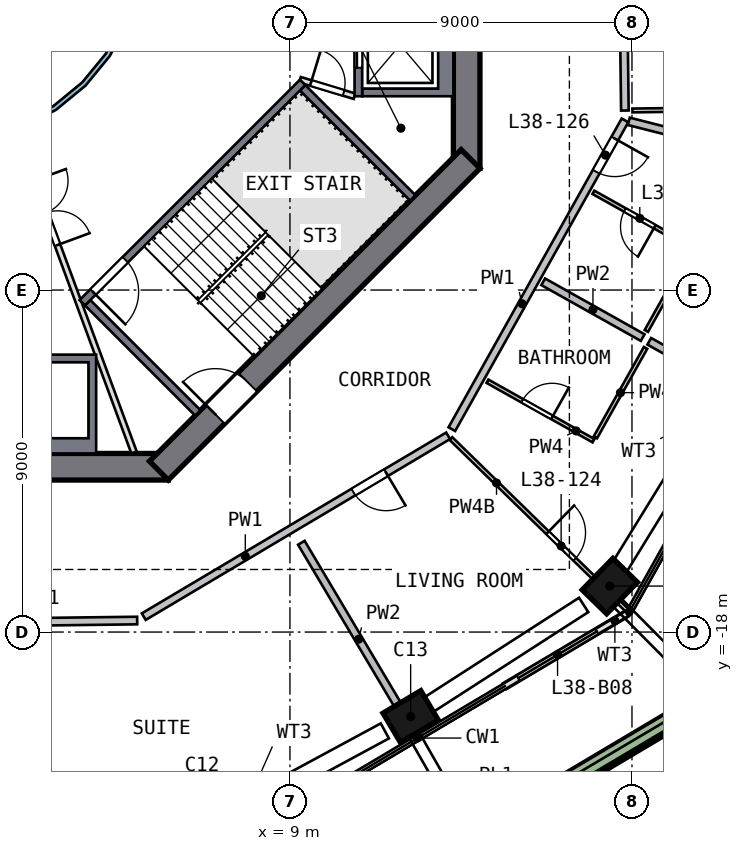
"""IFC4 building model, lengths in metres.
Left out: names, types, materials, properties, quantities, classifications, styles, units other than length and angle.
Written with IfcOpenShell. Run it as: python <this file> out.ifc"""

import sys

from ifc_helpers import new_model, si_unit, direction, frame, frame_2d, origin, origin_2d, place, context, subcontext, project, spatial, polyline, rectangle, outline, extrude, element, fill, save


model = new_model("IFC4")
c1 = context("Model", 3, precision=1e-05, world=origin(), true_north=direction((0.0, 1.0)))
c2 = subcontext(c1, "Body", "Model", "MODEL_VIEW")
j1 = project(units=[si_unit("LENGTHUNIT", "METRE"), si_unit("PLANEANGLEUNIT", "RADIAN")], contexts=[c1])
p1 = place(None, origin())
s1 = spatial("IfcSite", under=j1, at=p1, CompositionType="ELEMENT")
p2 = place(p1, origin())
s2 = spatial("IfcBuilding", under=s1, at=p2, CompositionType="ELEMENT")
p3 = place(p2, frame((0.0, 0.0, 158.5)))
s3 = spatial("IfcBuildingStorey", under=s2, at=p3, CompositionType="ELEMENT", Elevation=158.5)
p4 = place(p3, frame((12.06, -20.295, 0.0), z_axis=(0.095976319, 0.058178989, 0.993681917), x_axis=(0.854089929, 0.507873055, -0.11222902)))
e1 = element("IfcColumn", 1, at=p4, inside=s3, PredefinedType="COLUMN", context=c2, shape_type="SweptSolid", body=[
    extrude(rectangle(XDim=1.15, YDim=0.9, at=origin_2d()), origin(), (0.0, 0.0, 1.0), 3.21),
])
p5 = place(p3, frame((17.32, -16.89, 0.0), z_axis=(0.079675403, 0.083020554, 0.993357649), x_axis=(-0.693882614, -0.710835619, 0.115063637)))
e2 = element("IfcColumn", 2, at=p5, inside=s3, PredefinedType="COLUMN", context=c2, shape_type="SweptSolid", body=[
    extrude(rectangle(XDim=1.15, YDim=0.9, at=origin_2d()), origin(), (0.0, 0.0, 1.0), 3.211),
])
p6 = place(p3, frame((13.65, -5.799, 0.0), z_axis=(0.0, 0.0, 1.0), x_axis=(0.0, 1.0, 0.0)))
e3 = element("IfcWall", 3, at=p6, inside=s3, PredefinedType="SHEAR", context=c2, shape_type="SweptSolid", body=[
    extrude(rectangle(XDim=11.598, YDim=0.7, at=frame_2d((5.799, 0.0))), origin(), (0.0, 0.0, 1.0), 3.5),
])
p7 = place(p6, frame((4.899, 0.0, 0.0)))
e4 = element("IfcOpeningElement", 4, at=p7, cuts=e3, PredefinedType="OPENING", context=c2, shape_type="SweptSolid", body=[
    extrude(rectangle(XDim=1.8, YDim=2.1, at=frame_2d((0.9, 1.05))), frame((0.0, 0.36, 0.0), z_axis=(0.0, -1.0, 0.0), x_axis=(1.0, 0.0, 0.0)), (0.0, 0.0, 1.0), 0.72),
])
p8 = place(p3, frame((-5.799, -13.65, 0.0), z_axis=(0.0, 0.0, 1.0), x_axis=(1.0, 0.0, 0.0)))
e5 = element("IfcWall", 5, at=p8, inside=s3, PredefinedType="SHEAR", context=c2, shape_type="SweptSolid", body=[
    extrude(rectangle(XDim=11.598, YDim=0.7, at=frame_2d((5.799, 0.0))), origin(), (0.0, 0.0, 1.0), 3.5),
])
p9 = place(p8, frame((4.899, 0.0, 0.0)))
e6 = element("IfcOpeningElement", 6, at=p9, cuts=e5, PredefinedType="OPENING", context=c2, shape_type="SweptSolid", body=[
    extrude(rectangle(XDim=1.8, YDim=2.1, at=frame_2d((0.9, 1.05))), frame((0.0, 0.36, 0.0), z_axis=(0.0, -1.0, 0.0), x_axis=(1.0, 0.0, 0.0)), (0.0, 0.0, 1.0), 0.72),
])
p10 = place(p3, frame((5.552, -13.752, 0.0), z_axis=(0.0, 0.0, 1.0), x_axis=(0.707106781, 0.707106781, 0.0)))
e7 = element("IfcWall", 7, at=p10, inside=s3, PredefinedType="SHEAR", context=c2, shape_type="SweptSolid", body=[
    extrude(rectangle(XDim=11.598, YDim=0.7, at=frame_2d((5.799, 0.0))), origin(), (0.0, 0.0, 1.0), 3.5),
])
p11 = place(p10, frame((2.099, 0.0, 0.0)))
e8 = element("IfcOpeningElement", 8, at=p11, cuts=e7, PredefinedType="OPENING", context=c2, shape_type="SweptSolid", body=[
    extrude(rectangle(XDim=1.2, YDim=2.1, at=frame_2d((0.6, 1.05))), frame((0.0, 0.36, 0.0), z_axis=(0.0, -1.0, 0.0), x_axis=(1.0, 0.0, 0.0)), (0.0, 0.0, 1.0), 0.72),
])
p12 = place(p3, frame((14.666, -19.416, 0.0), z_axis=(0.0, 0.0, 1.0), x_axis=(0.859691314, 0.510813905, 0.0)))
e9 = element("IfcWall", 9, at=p12, inside=s3, PredefinedType="SOLIDWALL", context=c2, shape_type="SweptSolid", body=[
    extrude(rectangle(XDim=3.71, YDim=0.15, at=frame_2d((1.855, 0.0))), origin(), (0.0, 0.0, 1.0), 2.475),
])
p13 = place(p12, frame((0.4, 0.0, 0.0)))
e10 = element("IfcOpeningElement", 10, at=p13, cuts=e9, PredefinedType="OPENING", context=c2, shape_type="SweptSolid", body=[
    extrude(rectangle(XDim=2.4, YDim=2.4, at=frame_2d((1.2, 1.2))), frame((0.0, 0.085, 0.0), z_axis=(0.0, -1.0, 0.0), x_axis=(1.0, 0.0, 0.0)), (0.0, 0.0, 1.0), 0.17),
])
p14 = place(p3, frame((8.741, -26.455, 0.0), z_axis=(0.0, 0.0, 1.0), x_axis=(0.85967461, 0.510842016, 0.0)))
e11 = element("IfcWall", 11, at=p14, inside=s3, PredefinedType="SOLIDWALL", context=c2, shape_type="SweptSolid", body=[
    extrude(rectangle(XDim=13.224, YDim=0.5, at=frame_2d((6.612, 0.0))), origin(), (0.0, 0.0, 1.0), 0.7),
])
p15 = place(p3, origin())
e12 = element("IfcWall", 12, at=p15, inside=s3, PredefinedType="SOLIDWALL", context=c2, shape_type="SweptSolid", body=[
    extrude(outline(polyline([(13.3, -3.9), (10.9, -3.9), (10.9, -3.7), (12.9, -3.7), (12.9, -1.4), (10.9, -1.4), (10.9, -1.2), (13.3, -1.2), (13.3, -3.9)])), origin(), (0.0, 0.0, 1.0), 3.19),
])
p16 = place(p3, frame((10.8, -1.2, 0.0), z_axis=(0.0, 0.0, 1.0), x_axis=(0.0, -1.0, 0.0)))
e13 = element("IfcWall", 13, at=p16, inside=s3, PredefinedType="SOLIDWALL", context=c2, shape_type="SweptSolid", body=[
    extrude(rectangle(XDim=2.7, YDim=0.2, at=frame_2d((1.35, 0.0))), origin(), (0.0, 0.0, 1.0), 3.19),
])
p17 = place(p16, frame((0.75, 0.0, 0.0)))
e14 = element("IfcOpeningElement", 14, at=p17, cuts=e13, PredefinedType="OPENING", context=c2, shape_type="SweptSolid", body=[
    extrude(rectangle(XDim=1.2, YDim=2.1, at=frame_2d((0.6, 1.05))), frame((0.0, 0.11, 0.0), z_axis=(0.0, -1.0, 0.0), x_axis=(1.0, 0.0, 0.0)), (0.0, 0.0, 1.0), 0.22),
])
p18 = place(p3, origin())
e15 = element("IfcWall", 15, at=p18, inside=s3, PredefinedType="SOLIDWALL", context=c2, shape_type="SweptSolid", body=[
    extrude(outline(polyline([(3.9, -10.7), (3.9, -13.3), (1.2, -13.3), (1.2, -10.7), (3.9, -10.7)]), holes=[polyline([(1.4, -12.9), (3.7, -12.9), (3.7, -10.9), (1.4, -10.9), (1.4, -12.9)])]), origin(), (0.0, 0.0, 1.0), 3.19),
])
p19 = place(p3, frame((9.334, -3.535, 0.0), z_axis=(0.0, 0.0, 1.0), x_axis=(-0.707106781, -0.707106781, 0.0)))
e16 = element("IfcWall", 16, at=p19, inside=s3, PredefinedType="SOLIDWALL", context=c2, shape_type="SweptSolid", body=[
    extrude(rectangle(XDim=8.2, YDim=0.2, at=frame_2d((4.1, 0.0))), origin(), (0.0, 0.0, 1.0), 3.19),
])
p20 = place(p19, frame((6.6, 0.0, 0.0)))
e17 = element("IfcOpeningElement", 17, at=p20, cuts=e16, PredefinedType="OPENING", context=c2, shape_type="SweptSolid", body=[
    extrude(rectangle(XDim=1.2, YDim=2.1, at=frame_2d((0.6, 1.05))), frame((0.0, 0.11, 0.0), z_axis=(0.0, -1.0, 0.0), x_axis=(1.0, 0.0, 0.0)), (0.0, 0.0, 1.0), 0.22),
])
for number, where, z_axis, x_axis in (
    (18, (3.677, -9.334, 0.0), (0.0, 0.0, 1.0), (0.707, -0.707, 0.0)),
    (19, (9.334, -3.677, 0.0), (0.0, 0.0, 1.0), (0.707, -0.707, 0.0)),
):
    element("IfcWall", number, at=place(p3, frame(where, z_axis=z_axis, x_axis=x_axis)), inside=s3, PredefinedType="SOLIDWALL", context=c2, shape_type="SweptSolid", body=[
        extrude(rectangle(XDim=4.1, YDim=0.2, at=frame_2d((2.05, 0.0))), origin(), (0.0, 0.0, 1.0), 3.19),
    ])
p21 = place(p3, frame((9.263, -3.465, 0.0), z_axis=(0.0, 0.0, 1.0), x_axis=(0.957084567, -0.289808785, 0.0)))
e20 = element("IfcWall", 20, at=p21, inside=s3, PredefinedType="PARTITIONING", context=c2, shape_type="SweptSolid", body=[
    extrude(rectangle(XDim=1.501, YDim=0.15, at=frame_2d((0.75, 0.0))), origin(), (0.0, 0.0, 1.0), 3.19),
])
p22 = place(p21, frame((0.301, 0.0, 0.0)))
e21 = element("IfcOpeningElement", 21, at=p22, cuts=e20, PredefinedType="OPENING", context=c2, shape_type="SweptSolid", body=[
    extrude(rectangle(XDim=0.9, YDim=2.1, at=frame_2d((0.45, 1.05))), frame((0.0, 0.085, 0.0), z_axis=(0.0, -1.0, 0.0), x_axis=(1.0, 0.0, 0.0)), (0.0, 0.0, 1.0), 0.17),
])
p23 = place(p3, frame((1.776, -4.813, 0.0), z_axis=(0.0, 0.0, 1.0), x_axis=(0.346109381, -0.938194168, 0.0)))
e22 = element("IfcWall", 22, at=p23, inside=s3, PredefinedType="PARTITIONING", context=c2, shape_type="SweptSolid", body=[
    extrude(rectangle(XDim=9.016, YDim=0.15, at=frame_2d((4.508, 0.0))), origin(), (0.0, 0.0, 1.0), 3.19),
])
p24 = place(p23, frame((1.4, 0.0, 0.0)))
e23 = element("IfcOpeningElement", 23, at=p24, cuts=e22, PredefinedType="OPENING", context=c2, shape_type="SweptSolid", body=[
    extrude(rectangle(XDim=1.8, YDim=2.1, at=frame_2d((0.9, 1.05))), frame((0.0, 0.085, 0.0), z_axis=(0.0, -1.0, 0.0), x_axis=(1.0, 0.0, 0.0)), (0.0, 0.0, 1.0), 0.17),
])
p25 = place(p3, origin())
e24 = element("IfcWall", 24, at=p25, inside=s3, PredefinedType="SOLIDWALL", context=c2, shape_type="SweptSolid", body=[
    extrude(outline(polyline([(5.021, -0.999), (4.73, -1.959), (4.257, -2.844), (3.62, -3.62), (2.844, -4.257), (1.959, -4.73), (0.999, -5.021), (0.0, -5.12), (-0.999, -5.021), (-1.959, -4.73), (-2.844, -4.257), (-3.62, -3.62), (-4.257, -2.844), (-4.73, -1.959), (-5.021, -0.999), (-5.12, 0.0), (-5.021, 0.999), (-4.73, 1.959), (-4.257, 2.844), (-3.62, 3.62), (-2.844, 4.257), (-1.959, 4.73), (-0.999, 5.021), (0.0, 5.12), (0.999, 5.021), (1.959, 4.73), (2.844, 4.257), (3.62, 3.62), (4.257, 2.844), (4.73, 1.959), (5.021, 0.999), (5.12, 0.0), (5.021, -0.999)]), holes=[polyline([(4.904, 0.976), (4.619, 1.913), (4.157, 2.778), (3.535, 3.535), (2.778, 4.157), (1.913, 4.619), (0.976, 4.904), (0.0, 5.0), (-0.976, 4.904), (-1.913, 4.619), (-2.778, 4.157), (-3.535, 3.535), (-4.157, 2.778), (-4.619, 1.913), (-4.904, 0.976), (-5.0, 0.0), (-4.904, -0.976), (-4.619, -1.913), (-4.157, -2.778), (-3.535, -3.535), (-2.778, -4.157), (-1.913, -4.619), (-0.976, -4.904), (0.0, -5.0), (0.976, -4.904), (1.913, -4.619), (2.778, -4.157), (3.535, -3.535), (4.157, -2.778), (4.619, -1.913), (4.904, -0.976), (5.0, 0.0), (4.904, 0.976)])]), origin(), (0.0, 0.0, 1.0), 3.19),
])
p26 = place(p3, frame((4.981, -17.697, 0.0), z_axis=(0.0, 0.0, 1.0), x_axis=(-0.999920882, -0.01257894, 0.0)))
e25 = element("IfcWall", 25, at=p26, inside=s3, PredefinedType="SOLIDWALL", context=c2, shape_type="SweptSolid", body=[
    extrude(rectangle(XDim=9.316, YDim=0.2, at=frame_2d((4.658, 0.0))), origin(), (0.0, 0.0, 1.0), 3.19),
])
p27 = place(p26, frame((5.15, 0.0, 0.0)))
e26 = element("IfcOpeningElement", 26, at=p27, cuts=e25, PredefinedType="OPENING", context=c2, shape_type="SweptSolid", body=[
    extrude(rectangle(XDim=1.0, YDim=2.1, at=frame_2d((0.5, 1.05))), frame((0.0, 0.11, 0.0), z_axis=(0.0, -1.0, 0.0), x_axis=(1.0, 0.0, 0.0)), (0.0, 0.0, 1.0), 0.22),
])
p28 = place(p3, frame((13.162, -12.836, 0.0), z_axis=(0.0, 0.0, 1.0), x_axis=(-0.859674935, -0.510841468, 0.0)))
e27 = element("IfcWall", 27, at=p28, inside=s3, PredefinedType="SOLIDWALL", context=c2, shape_type="SweptSolid", body=[
    extrude(rectangle(XDim=9.316, YDim=0.2, at=frame_2d((4.658, 0.0))), origin(), (0.0, 0.0, 1.0), 3.19),
])
p29 = place(p28, frame((1.9, 0.0, 0.0)))
e28 = element("IfcOpeningElement", 28, at=p29, cuts=e27, PredefinedType="OPENING", context=c2, shape_type="SweptSolid", body=[
    extrude(rectangle(XDim=1.0, YDim=2.1, at=frame_2d((0.5, 1.05))), frame((0.0, 0.11, 0.0), z_axis=(0.0, -1.0, 0.0), x_axis=(1.0, 0.0, 0.0)), (0.0, 0.0, 1.0), 0.22),
])
p30 = place(p3, frame((17.817, -4.535, 0.0), z_axis=(0.0, 0.0, 1.0), x_axis=(-0.489090048, -0.872233297, 0.0)))
e29 = element("IfcWall", 29, at=p30, inside=s3, PredefinedType="SOLIDWALL", context=c2, shape_type="SweptSolid", body=[
    extrude(rectangle(XDim=9.317, YDim=0.2, at=frame_2d((4.658, 0.0))), origin(), (0.0, 0.0, 1.0), 3.19),
])
p31 = place(p30, frame((0.55, 0.0, 0.0)))
e30 = element("IfcOpeningElement", 30, at=p31, cuts=e29, PredefinedType="OPENING", context=c2, shape_type="SweptSolid", body=[
    extrude(rectangle(XDim=1.0, YDim=2.1, at=frame_2d((0.5, 1.05))), frame((0.0, 0.11, 0.0), z_axis=(0.0, -1.0, 0.0), x_axis=(1.0, 0.0, 0.0)), (0.0, 0.0, 1.0), 0.22),
])
p32 = place(p3, frame((17.813, -4.277, 0.0), z_axis=(0.0, 0.0, 1.0), x_axis=(-0.01256543, 0.999921052, 0.0)))
e31 = element("IfcWall", 31, at=p32, inside=s3, PredefinedType="SOLIDWALL", context=c2, shape_type="SweptSolid", body=[
    extrude(rectangle(XDim=3.4, YDim=0.2, at=frame_2d((1.7, 0.0))), origin(), (0.0, 0.0, 1.0), 3.19),
])
p33 = place(p3, frame((9.3, -15.651, 0.0), z_axis=(0.0, 0.0, 1.0), x_axis=(0.510811085, -0.859692989, 0.0)))
e32 = element("IfcWall", 32, at=p33, inside=s3, PredefinedType="SOLIDWALL", context=c2, shape_type="SweptSolid", body=[
    extrude(rectangle(XDim=5.903, YDim=0.2, at=frame_2d((2.951, 0.0))), origin(), (0.0, 0.0, 1.0), 3.19),
])
p34 = place(p3, frame((15.664, -8.783, 0.0), z_axis=(0.0, 0.0, 1.0), x_axis=(0.872228513, -0.489098581, 0.0)))
e33 = element("IfcWall", 33, at=p34, inside=s3, PredefinedType="SOLIDWALL", context=c2, shape_type="SweptSolid", body=[
    extrude(rectangle(XDim=3.002, YDim=0.2, at=frame_2d((1.501, 0.0))), origin(), (0.0, 0.0, 1.0), 3.19),
])
p35 = place(p3, frame((18.455, -10.348, 0.0), z_axis=(0.0, 0.0, 1.0), x_axis=(0.872237762, -0.489082085, 0.0)))
e34 = element("IfcWall", 34, at=p35, inside=s3, PredefinedType="SOLIDWALL", context=c2, shape_type="SweptSolid", body=[
    extrude(rectangle(XDim=2.95, YDim=0.2, at=frame_2d((1.475, 0.0))), origin(), (0.0, 0.0, 1.0), 3.19),
])
p36 = place(p3, frame((17.917, -4.56, 0.0), z_axis=(0.0, 0.0, 1.0), x_axis=(0.969097993, -0.246676062, 0.0)))
e35 = element("IfcWall", 35, at=p36, inside=s3, PredefinedType="SOLIDWALL", context=c2, shape_type="SweptSolid", body=[
    extrude(rectangle(XDim=6.476, YDim=0.2, at=frame_2d((3.238, 0.0))), origin(), (0.0, 0.0, 1.0), 3.19),
])
p37 = place(p3, frame((13.237, -12.908, 0.0), z_axis=(0.0, 0.0, 1.0), x_axis=(0.71592947, -0.69817261, 0.0)))
e36 = element("IfcWall", 36, at=p37, inside=s3, PredefinedType="PARTITIONING", context=c2, shape_type="SweptSolid", body=[
    extrude(rectangle(XDim=6.476, YDim=0.1, at=frame_2d((3.238, 0.0))), origin(), (0.0, 0.0, 1.0), 2.69),
])
p38 = place(p37, frame((3.55, 0.0, 0.0)))
e37 = element("IfcOpeningElement", 37, at=p38, cuts=e36, PredefinedType="OPENING", context=c2, shape_type="SweptSolid", body=[
    extrude(rectangle(XDim=1.0, YDim=2.1, at=frame_2d((0.5, 1.05))), frame((0.0, 0.06, 0.0), z_axis=(0.0, -1.0, 0.0), x_axis=(1.0, 0.0, 0.0)), (0.0, 0.0, 1.0), 0.12),
])
p39 = place(p3, frame((14.197, -11.4, 0.0), z_axis=(0.0, 0.0, 1.0), x_axis=(0.872210525, -0.489130657, 0.0)))
e38 = element("IfcWall", 38, at=p39, inside=s3, PredefinedType="PARTITIONING", context=c2, shape_type="SweptSolid", body=[
    extrude(rectangle(XDim=3.2, YDim=0.1, at=frame_2d((1.6, 0.0))), origin(), (0.0, 0.0, 1.0), 3.19),
])
p40 = place(p39, frame((1.05, 0.0, 0.0)))
e39 = element("IfcOpeningElement", 39, at=p40, cuts=e38, PredefinedType="OPENING", context=c2, shape_type="SweptSolid", body=[
    extrude(rectangle(XDim=0.9, YDim=2.1, at=frame_2d((0.45, 1.05))), frame((0.0, 0.06, 0.0), z_axis=(0.0, -1.0, 0.0), x_axis=(1.0, 0.0, 0.0)), (0.0, 0.0, 1.0), 0.12),
])
p41 = place(p3, frame((17.037, -12.878, 0.0), z_axis=(0.0, 0.0, 1.0), x_axis=(0.489063093, 0.872248411, 0.0)))
e40 = element("IfcWall", 40, at=p41, inside=s3, PredefinedType="PARTITIONING", context=c2, shape_type="SweptSolid", body=[
    extrude(rectangle(XDim=2.7, YDim=0.1, at=frame_2d((1.35, 0.0))), origin(), (0.0, 0.0, 1.0), 3.19),
])
p42 = place(p3, frame((19.601, -7.895, 0.0), z_axis=(0.0, 0.0, 1.0), x_axis=(-0.872231109, 0.489093951, 0.0)))
e41 = element("IfcWall", 41, at=p42, inside=s3, PredefinedType="PARTITIONING", context=c2, shape_type="SweptSolid", body=[
    extrude(rectangle(XDim=3.0, YDim=0.1, at=frame_2d((1.5, 0.0))), origin(), (0.0, 0.0, 1.0), 3.19),
])
p43 = place(p42, frame((1.15, 0.0, 0.0)))
e42 = element("IfcOpeningElement", 42, at=p43, cuts=e41, PredefinedType="OPENING", context=c2, shape_type="SweptSolid", body=[
    extrude(rectangle(XDim=0.9, YDim=2.1, at=frame_2d((0.45, 1.05))), frame((0.0, 0.06, 0.0), z_axis=(0.0, -1.0, 0.0), x_axis=(1.0, 0.0, 0.0)), (0.0, 0.0, 1.0), 0.12),
])
p44 = place(p3, frame((19.552, -7.982, 0.0), z_axis=(0.0, 0.0, 1.0), x_axis=(-0.48911131, -0.872221375, 0.0)))
e43 = element("IfcWall", 43, at=p44, inside=s3, PredefinedType="PARTITIONING", context=c2, shape_type="SweptSolid", body=[
    extrude(rectangle(XDim=2.4, YDim=0.1, at=frame_2d((1.2, 0.0))), origin(), (0.0, 0.0, 1.0), 3.19),
])
p45 = place(p3, frame((18.013, -4.274, 0.0), z_axis=(0.0, 0.0, 1.0), x_axis=(0.999921006, 0.012569092, 0.0)))
e44 = element("IfcWall", 44, at=p45, inside=s3, PredefinedType="PARTITIONING", context=c2, shape_type="SweptSolid", body=[
    extrude(rectangle(XDim=2.7, YDim=0.1, at=frame_2d((1.35, 0.0))), origin(), (0.0, 0.0, 1.0), 3.19),
])
p46 = place(p13, origin())
e45 = element("IfcDoor", 45, at=p46, inside=s3, OperationType="SLIDING_TO_RIGHT", PredefinedType="DOOR", context=c2, shape_type="SweptSolid", body=[
    extrude(rectangle(XDim=2.4, YDim=2.4, at=frame_2d((1.2, 1.2))), frame((0.0, 0.025, 0.0), z_axis=(0.0, -1.0, 0.0), x_axis=(1.0, 0.0, 0.0)), (0.0, 0.0, 1.0), 0.05),
])
fill(e10, e45)
p47 = place(p17, origin())
e46 = element("IfcDoor", 46, at=p47, inside=s3, OperationType="DOUBLE_DOOR_SLIDING", PredefinedType="DOOR", context=c2, shape_type="SweptSolid", body=[
    extrude(rectangle(XDim=1.2, YDim=2.1, at=frame_2d((0.6, 1.05))), frame((0.0, 0.025, 0.0), z_axis=(0.0, -1.0, 0.0), x_axis=(1.0, 0.0, 0.0)), (0.0, 0.0, 1.0), 0.05),
])
fill(e14, e46)
p48 = place(p20, origin())
e47 = element("IfcDoor", 47, at=p48, inside=s3, OperationType="SINGLE_SWING_RIGHT", PredefinedType="DOOR", context=c2, shape_type="SweptSolid", body=[
    extrude(rectangle(XDim=1.2, YDim=2.1, at=frame_2d((0.6, 1.05))), frame((0.0, 0.025, 0.0), z_axis=(0.0, -1.0, 0.0), x_axis=(1.0, 0.0, 0.0)), (0.0, 0.0, 1.0), 0.05),
])
fill(e17, e47)
p49 = place(p11, origin())
e48 = element("IfcDoor", 48, at=p49, inside=s3, OperationType="SINGLE_SWING_LEFT", PredefinedType="DOOR", context=c2, shape_type="SweptSolid", body=[
    extrude(rectangle(XDim=1.2, YDim=2.1, at=frame_2d((0.6, 1.05))), frame((0.0, 0.025, 0.0), z_axis=(0.0, -1.0, 0.0), x_axis=(1.0, 0.0, 0.0)), (0.0, 0.0, 1.0), 0.05),
])
fill(e8, e48)
p50 = place(p22, origin())
e49 = element("IfcDoor", 49, at=p50, inside=s3, OperationType="SINGLE_SWING_LEFT", PredefinedType="DOOR", context=c2, shape_type="SweptSolid", body=[
    extrude(rectangle(XDim=0.9, YDim=2.1, at=frame_2d((0.45, 1.05))), frame((0.0, 0.025, 0.0), z_axis=(0.0, -1.0, 0.0), x_axis=(1.0, 0.0, 0.0)), (0.0, 0.0, 1.0), 0.05),
])
fill(e21, e49)
p51 = place(p24, origin())
e50 = element("IfcDoor", 50, at=p51, inside=s3, OperationType="DOUBLE_DOOR_SINGLE_SWING", PredefinedType="DOOR", context=c2, shape_type="SweptSolid", body=[
    extrude(rectangle(XDim=1.8, YDim=2.1, at=frame_2d((0.9, 1.05))), frame((0.0, 0.025, 0.0), z_axis=(0.0, -1.0, 0.0), x_axis=(1.0, 0.0, 0.0)), (0.0, 0.0, 1.0), 0.05),
])
fill(e23, e50)
p52 = place(p29, origin())
e51 = element("IfcDoor", 51, at=p52, inside=s3, OperationType="SINGLE_SWING_LEFT", PredefinedType="DOOR", context=c2, shape_type="SweptSolid", body=[
    extrude(rectangle(XDim=1.0, YDim=2.1, at=frame_2d((0.5, 1.05))), frame((0.0, 0.025, 0.0), z_axis=(0.0, -1.0, 0.0), x_axis=(1.0, 0.0, 0.0)), (0.0, 0.0, 1.0), 0.05),
])
fill(e28, e51)
p53 = place(p38, origin())
e52 = element("IfcDoor", 52, at=p53, inside=s3, OperationType="SINGLE_SWING_LEFT", PredefinedType="DOOR", context=c2, shape_type="SweptSolid", body=[
    extrude(rectangle(XDim=1.0, YDim=2.1, at=frame_2d((0.5, 1.05))), frame((0.0, 0.025, 0.0), z_axis=(0.0, -1.0, 0.0), x_axis=(1.0, 0.0, 0.0)), (0.0, 0.0, 1.0), 0.05),
])
fill(e37, e52)
p54 = place(p40, origin())
e53 = element("IfcDoor", 53, at=p54, inside=s3, OperationType="SINGLE_SWING_RIGHT", PredefinedType="DOOR", context=c2, shape_type="SweptSolid", body=[
    extrude(rectangle(XDim=0.9, YDim=2.1, at=frame_2d((0.45, 1.05))), frame((0.0, 0.025, 0.0), z_axis=(0.0, -1.0, 0.0), x_axis=(1.0, 0.0, 0.0)), (0.0, 0.0, 1.0), 0.05),
])
fill(e39, e53)
p55 = place(p31, origin())
e54 = element("IfcDoor", 54, at=p55, inside=s3, OperationType="SINGLE_SWING_LEFT", PredefinedType="DOOR", context=c2, shape_type="SweptSolid", body=[
    extrude(rectangle(XDim=1.0, YDim=2.1, at=frame_2d((0.5, 1.05))), frame((0.0, 0.025, 0.0), z_axis=(0.0, -1.0, 0.0), x_axis=(1.0, 0.0, 0.0)), (0.0, 0.0, 1.0), 0.05),
])
fill(e30, e54)
p56 = place(p43, origin())
e55 = element("IfcDoor", 55, at=p56, inside=s3, OperationType="SINGLE_SWING_LEFT", PredefinedType="DOOR", context=c2, shape_type="SweptSolid", body=[
    extrude(rectangle(XDim=0.9, YDim=2.1, at=frame_2d((0.45, 1.05))), frame((0.0, 0.025, 0.0), z_axis=(0.0, -1.0, 0.0), x_axis=(1.0, 0.0, 0.0)), (0.0, 0.0, 1.0), 0.05),
])
fill(e42, e55)
save(model, sys.argv[1])
